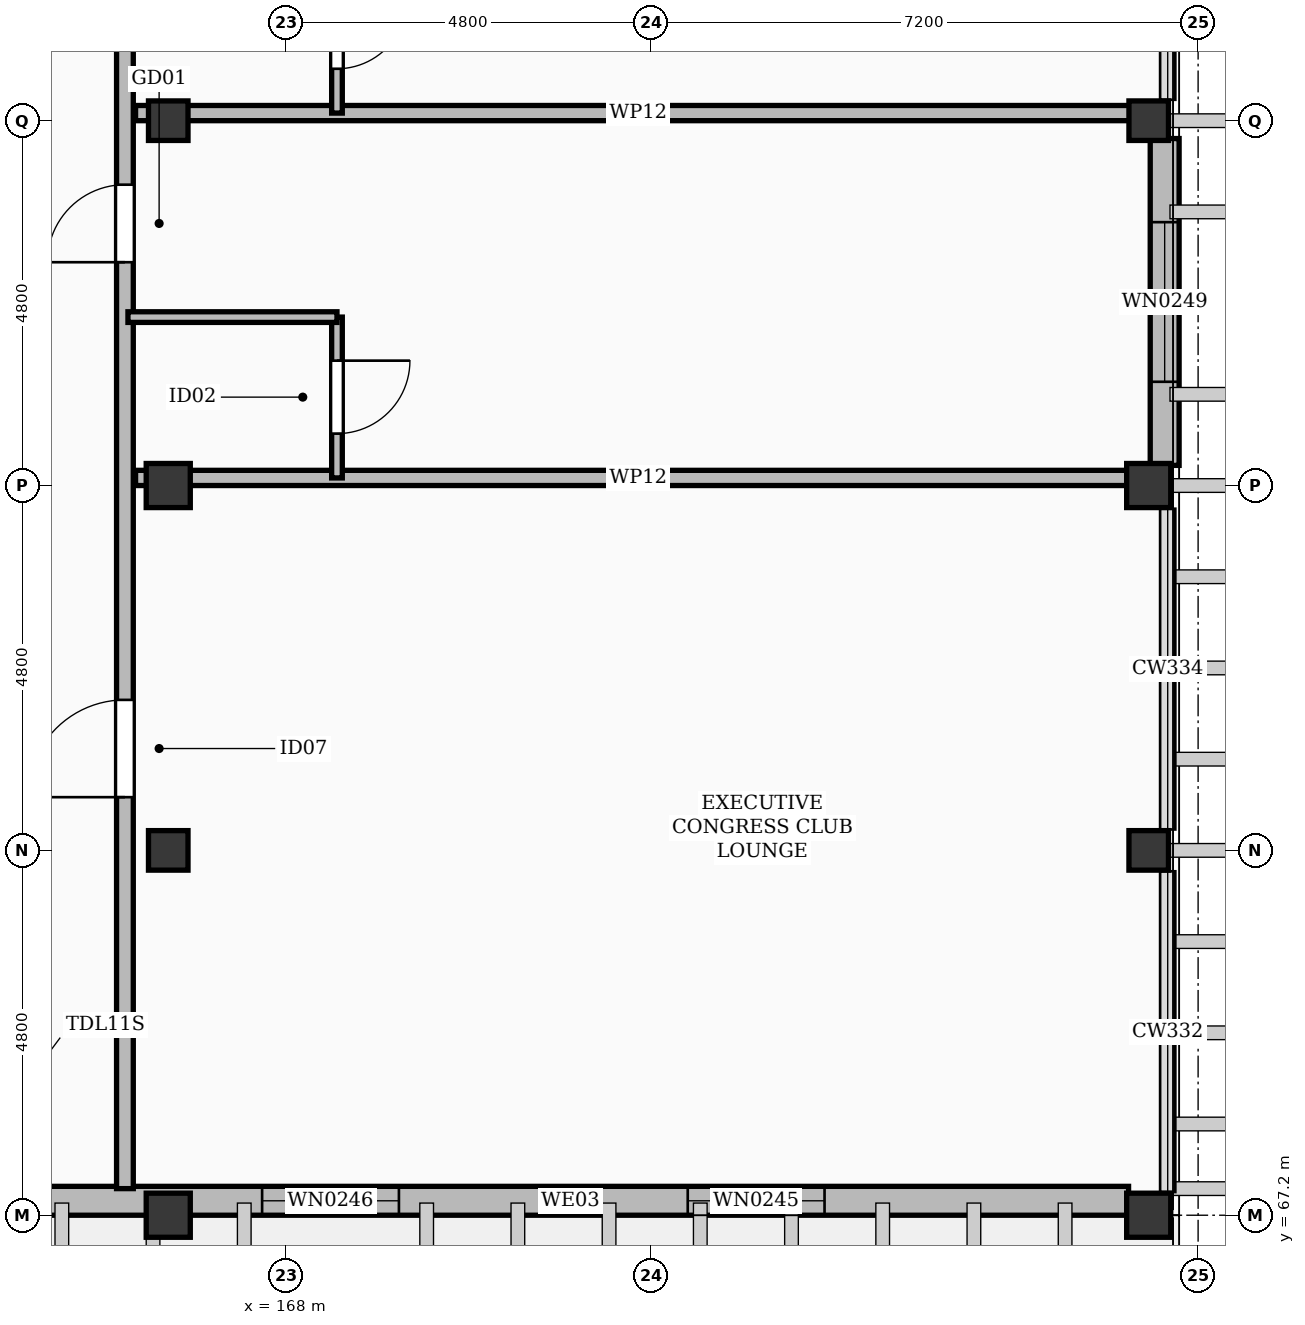
"""IFC4 building model, lengths in metres.
Left out: names, types, materials, properties, quantities, classifications, styles, units other than length and angle.
Written with IfcOpenShell. Run it as: python <this file> out.ifc"""

import sys

from ifc_helpers import new_model, si_unit, direction, frame, frame_2d, origin, origin_2d, place, context, subcontext, project, spatial, rectangle, extrude, element, fill, save


model = new_model("IFC4")
c1 = context("Model", 3, precision=1e-05, world=origin(), true_north=direction((0.0, 1.0)))
c2 = subcontext(c1, "Body", "Model", "MODEL_VIEW")
j1 = project(units=[si_unit("LENGTHUNIT", "METRE"), si_unit("PLANEANGLEUNIT", "RADIAN")], contexts=[c1])
p1 = place(None, origin())
s1 = spatial("IfcSite", under=j1, at=p1, CompositionType="ELEMENT")
p2 = place(p1, origin())
s2 = spatial("IfcBuilding", under=s1, at=p2, CompositionType="ELEMENT")
p3 = place(p2, frame((0.0, 0.0, 46.5)))
s3 = spatial("IfcBuildingStorey", under=s2, at=p3, CompositionType="ELEMENT", Elevation=46.5)
for number, where, z_axis, x_axis in (
    (1, (166.45, 67.2, 0.0), (0.0, 0.0, 1.0), (1.0, 0.0, 0.0)),
    (2, (166.45, 76.8, 0.0), (0.0, 0.0, 1.0), (1.0, 0.0, 0.0)),
    (3, (179.35, 67.2, 0.0), (0.0, 0.0, 1.0), (1.0, 0.0, 0.0)),
    (4, (179.35, 76.8, 0.0), (0.0, 0.0, 1.0), (1.0, 0.0, 0.0)),
):
    element("IfcColumn", number, at=place(p3, frame(where, z_axis=z_axis, x_axis=x_axis)), inside=s3, PredefinedType="COLUMN", context=c2, shape_type="SweptSolid", body=[
        extrude(rectangle(XDim=0.58, YDim=0.58, at=origin_2d()), origin(), (0.0, 0.0, 1.0), 3.9),
    ])
for number, where, z_axis, x_axis in (
    (5, (166.45, 72.0, 0.0), (0.0, 0.0, 1.0), (1.0, 0.0, 0.0)),
    (6, (166.45, 81.6, 0.0), (0.0, 0.0, 1.0), (1.0, 0.0, 0.0)),
    (7, (179.35, 72.0, 0.0), (0.0, 0.0, 1.0), (1.0, 0.0, 0.0)),
    (8, (179.35, 81.6, 0.0), (0.0, 0.0, 1.0), (1.0, 0.0, 0.0)),
):
    element("IfcColumn", number, at=place(p3, frame(where, z_axis=z_axis, x_axis=x_axis)), inside=s3, PredefinedType="COLUMN", context=c2, shape_type="SweptSolid", body=[
        extrude(rectangle(XDim=0.52, YDim=0.52, at=origin_2d()), origin(), (0.0, 0.0, 1.0), 3.9),
    ])
p4 = place(p3, frame((179.085, 67.39, 0.0), z_axis=(0.0, 0.0, 1.0), x_axis=(-1.0, 0.0, 0.0)))
e9 = element("IfcWall", 9, at=p4, inside=s3, PredefinedType="SOLIDWALL", context=c2, shape_type="SweptSolid", body=[
    extrude(rectangle(XDim=29.37, YDim=0.38, at=frame_2d((14.685, 0.0))), origin(), (0.0, 0.0, 1.0), 2.922),
])
p5 = place(p4, frame((14.5, 0.0, 0.0)))
e10 = element("IfcOpeningElement", 10, at=p5, cuts=e9, PredefinedType="OPENING", context=c2, shape_type="SweptSolid", body=[
    extrude(rectangle(XDim=1.6, YDim=2.25, at=frame_2d((0.8, 1.125))), frame((0.0, 0.202, 0.0), z_axis=(0.0, -1.0, 0.0), x_axis=(1.0, 0.0, 0.0)), (0.0, 0.0, 1.0), 0.404),
])
p6 = place(p4, frame((4.0, 0.0, 0.55)))
e11 = element("IfcOpeningElement", 11, at=p6, cuts=e9, PredefinedType="OPENING", context=c2, shape_type="SweptSolid", body=[
    extrude(rectangle(XDim=1.8, YDim=1.76, at=frame_2d((0.9, 0.88))), frame((0.0, 0.202, 0.0), z_axis=(0.0, -1.0, 0.0), x_axis=(1.0, 0.0, 0.0)), (0.0, 0.0, 1.0), 0.404),
])
p7 = place(p4, frame((9.6, 0.0, 0.55)))
e12 = element("IfcOpeningElement", 12, at=p7, cuts=e9, PredefinedType="OPENING", context=c2, shape_type="SweptSolid", body=[
    extrude(rectangle(XDim=1.8, YDim=1.76, at=frame_2d((0.9, 0.88))), frame((0.0, 0.202, 0.0), z_axis=(0.0, -1.0, 0.0), x_axis=(1.0, 0.0, 0.0)), (0.0, 0.0, 1.0), 0.404),
])
p8 = place(p4, frame((20.8, 0.0, 0.55)))
e13 = element("IfcOpeningElement", 13, at=p8, cuts=e9, PredefinedType="OPENING", context=c2, shape_type="SweptSolid", body=[
    extrude(rectangle(XDim=1.8, YDim=1.76, at=frame_2d((0.9, 0.88))), frame((0.0, 0.202, 0.0), z_axis=(0.0, -1.0, 0.0), x_axis=(1.0, 0.0, 0.0)), (0.0, 0.0, 1.0), 0.404),
])
p9 = place(p4, frame((25.4, 0.0, 0.55)))
e14 = element("IfcOpeningElement", 14, at=p9, cuts=e9, PredefinedType="OPENING", context=c2, shape_type="SweptSolid", body=[
    extrude(rectangle(XDim=1.8, YDim=1.76, at=frame_2d((0.9, 0.88))), frame((0.0, 0.202, 0.0), z_axis=(0.0, -1.0, 0.0), x_axis=(1.0, 0.0, 0.0)), (0.0, 0.0, 1.0), 0.404),
])
p10 = place(p3, frame((179.56, 81.365, 0.0), z_axis=(0.0, 0.0, 1.0), x_axis=(0.0, -1.0, 0.0)))
e15 = element("IfcWall", 15, at=p10, inside=s3, PredefinedType="SOLIDWALL", context=c2, shape_type="SweptSolid", body=[
    extrude(rectangle(XDim=4.3, YDim=0.38, at=frame_2d((2.15, 0.0))), origin(), (0.0, 0.0, 1.0), 3.072),
])
p11 = place(p10, frame((1.1, 0.0, 0.55)))
e16 = element("IfcOpeningElement", 16, at=p11, cuts=e15, PredefinedType="OPENING", context=c2, shape_type="SweptSolid", body=[
    extrude(rectangle(XDim=2.1, YDim=1.78, at=frame_2d((1.05, 0.89))), frame((0.0, 0.202, 0.0), z_axis=(0.0, -1.0, 0.0), x_axis=(1.0, 0.0, 0.0)), (0.0, 0.0, 1.0), 0.404),
])
p12 = place(p3, frame((165.88, 67.55, 0.0), z_axis=(0.0, 0.0, 1.0), x_axis=(0.0, 1.0, 0.0)))
e17 = element("IfcWall", 17, at=p12, inside=s3, PredefinedType="PARTITIONING", context=c2, shape_type="SweptSolid", body=[
    extrude(rectangle(XDim=58.1, YDim=0.22, at=frame_2d((29.05, 0.0))), origin(), (0.0, 0.0, 1.0), 2.922),
])
p13 = place(p12, frame((5.15, 0.0, 0.0)))
e18 = element("IfcOpeningElement", 18, at=p13, cuts=e17, PredefinedType="OPENING", context=c2, shape_type="SweptSolid", body=[
    extrude(rectangle(XDim=1.28, YDim=2.16, at=frame_2d((0.64, 1.08))), frame((0.0, 0.122, 0.0), z_axis=(0.0, -1.0, 0.0), x_axis=(1.0, 0.0, 0.0)), (0.0, 0.0, 1.0), 0.244),
])
p14 = place(p12, frame((12.188, 0.0, 0.0)))
e19 = element("IfcOpeningElement", 19, at=p14, cuts=e17, PredefinedType="OPENING", context=c2, shape_type="SweptSolid", body=[
    extrude(rectangle(XDim=1.02, YDim=2.2, at=frame_2d((0.51, 1.1))), frame((0.0, 0.122, 0.0), z_axis=(0.0, -1.0, 0.0), x_axis=(1.0, 0.0, 0.0)), (0.0, 0.0, 1.0), 0.244),
])
p15 = place(p12, frame((16.638, 0.0, 0.0)))
e20 = element("IfcOpeningElement", 20, at=p15, cuts=e17, PredefinedType="OPENING", context=c2, shape_type="SweptSolid", body=[
    extrude(rectangle(XDim=1.5, YDim=2.3, at=frame_2d((0.75, 1.15))), frame((0.0, 0.122, 0.0), z_axis=(0.0, -1.0, 0.0), x_axis=(1.0, 0.0, 0.0)), (0.0, 0.0, 1.0), 0.244),
])
p16 = place(p12, frame((21.788, 0.0, 0.0)))
e21 = element("IfcOpeningElement", 21, at=p16, cuts=e17, PredefinedType="OPENING", context=c2, shape_type="SweptSolid", body=[
    extrude(rectangle(XDim=1.12, YDim=2.15, at=frame_2d((0.56, 1.075))), frame((0.0, 0.122, 0.0), z_axis=(0.0, -1.0, 0.0), x_axis=(1.0, 0.0, 0.0)), (0.0, 0.0, 1.0), 0.244),
])
p17 = place(p12, frame((26.588, 0.0, 0.0)))
e22 = element("IfcOpeningElement", 22, at=p17, cuts=e17, PredefinedType="OPENING", context=c2, shape_type="SweptSolid", body=[
    extrude(rectangle(XDim=1.28, YDim=2.16, at=frame_2d((0.64, 1.08))), frame((0.0, 0.122, 0.0), z_axis=(0.0, -1.0, 0.0), x_axis=(1.0, 0.0, 0.0)), (0.0, 0.0, 1.0), 0.244),
])
p18 = place(p12, frame((31.388, 0.0, 0.0)))
e23 = element("IfcOpeningElement", 23, at=p18, cuts=e17, PredefinedType="OPENING", context=c2, shape_type="SweptSolid", body=[
    extrude(rectangle(XDim=1.05, YDim=2.18, at=frame_2d((0.525, 1.09))), frame((0.0, 0.122, 0.0), z_axis=(0.0, -1.0, 0.0), x_axis=(1.0, 0.0, 0.0)), (0.0, 0.0, 1.0), 0.244),
])
p19 = place(p12, frame((36.188, 0.0, 0.0)))
e24 = element("IfcOpeningElement", 24, at=p19, cuts=e17, PredefinedType="OPENING", context=c2, shape_type="SweptSolid", body=[
    extrude(rectangle(XDim=1.08, YDim=2.25, at=frame_2d((0.54, 1.125))), frame((0.0, 0.122, 0.0), z_axis=(0.0, -1.0, 0.0), x_axis=(1.0, 0.0, 0.0)), (0.0, 0.0, 1.0), 0.244),
])
p20 = place(p12, frame((40.988, 0.0, 0.0)))
e25 = element("IfcOpeningElement", 25, at=p20, cuts=e17, PredefinedType="OPENING", context=c2, shape_type="SweptSolid", body=[
    extrude(rectangle(XDim=1.02, YDim=2.2, at=frame_2d((0.51, 1.1))), frame((0.0, 0.122, 0.0), z_axis=(0.0, -1.0, 0.0), x_axis=(1.0, 0.0, 0.0)), (0.0, 0.0, 1.0), 0.244),
])
p21 = place(p12, frame((45.438, 0.0, 0.0)))
e26 = element("IfcOpeningElement", 26, at=p21, cuts=e17, PredefinedType="OPENING", context=c2, shape_type="SweptSolid", body=[
    extrude(rectangle(XDim=1.5, YDim=2.3, at=frame_2d((0.75, 1.15))), frame((0.0, 0.122, 0.0), z_axis=(0.0, -1.0, 0.0), x_axis=(1.0, 0.0, 0.0)), (0.0, 0.0, 1.0), 0.244),
])
p22 = place(p12, frame((50.588, 0.0, 0.0)))
e27 = element("IfcOpeningElement", 27, at=p22, cuts=e17, PredefinedType="OPENING", context=c2, shape_type="SweptSolid", body=[
    extrude(rectangle(XDim=1.12, YDim=2.15, at=frame_2d((0.56, 1.075))), frame((0.0, 0.122, 0.0), z_axis=(0.0, -1.0, 0.0), x_axis=(1.0, 0.0, 0.0)), (0.0, 0.0, 1.0), 0.244),
])
p23 = place(p12, frame((55.388, 0.0, 0.0)))
e28 = element("IfcOpeningElement", 28, at=p23, cuts=e17, PredefinedType="OPENING", context=c2, shape_type="SweptSolid", body=[
    extrude(rectangle(XDim=1.28, YDim=2.16, at=frame_2d((0.64, 1.08))), frame((0.0, 0.122, 0.0), z_axis=(0.0, -1.0, 0.0), x_axis=(1.0, 0.0, 0.0)), (0.0, 0.0, 1.0), 0.244),
])
p24 = place(p3, frame((166.02, 76.9, 0.0), z_axis=(0.0, 0.0, 1.0), x_axis=(1.0, 0.0, 0.0)))
e29 = element("IfcWall", 29, at=p24, inside=s3, PredefinedType="PARTITIONING", context=c2, shape_type="SweptSolid", body=[
    extrude(rectangle(XDim=13.23, YDim=0.2, at=frame_2d((6.615, 0.0))), origin(), (0.0, 0.0, 1.0), 3.072),
])
p25 = place(p3, frame((168.67, 76.9, 0.0), z_axis=(0.0, 0.0, 1.0), x_axis=(0.0, 1.0, 0.0)))
e30 = element("IfcWall", 30, at=p25, inside=s3, PredefinedType="PARTITIONING", context=c2, shape_type="SweptSolid", body=[
    extrude(rectangle(XDim=2.116, YDim=0.14, at=frame_2d((1.058, 0.0))), origin(), (0.0, 0.0, 1.0), 3.072),
])
p26 = place(p25, frame((0.583, 0.0, 0.0)))
e31 = element("IfcOpeningElement", 31, at=p26, cuts=e30, PredefinedType="OPENING", context=c2, shape_type="SweptSolid", body=[
    extrude(rectangle(XDim=0.96, YDim=2.12, at=frame_2d((0.48, 1.06))), frame((0.0, 0.082, 0.0), z_axis=(0.0, -1.0, 0.0), x_axis=(1.0, 0.0, 0.0)), (0.0, 0.0, 1.0), 0.164),
])
p27 = place(p3, frame((165.92, 79.016, 0.0), z_axis=(0.0, 0.0, 1.0), x_axis=(1.0, 0.0, 0.0)))
e32 = element("IfcWall", 32, at=p27, inside=s3, PredefinedType="PARTITIONING", context=c2, shape_type="SweptSolid", body=[
    extrude(rectangle(XDim=2.75, YDim=0.14, at=frame_2d((1.375, 0.0))), origin(), (0.0, 0.0, 1.0), 3.072),
])
p28 = place(p3, frame((166.02, 81.7, 0.0), z_axis=(0.0, 0.0, 1.0), x_axis=(1.0, 0.0, 0.0)))
e33 = element("IfcWall", 33, at=p28, inside=s3, PredefinedType="PARTITIONING", context=c2, shape_type="SweptSolid", body=[
    extrude(rectangle(XDim=13.23, YDim=0.2, at=frame_2d((6.615, 0.0))), origin(), (0.0, 0.0, 1.0), 3.072),
])
p29 = place(p3, frame((168.67, 81.7, 0.0), z_axis=(0.0, 0.0, 1.0), x_axis=(0.0, 1.0, 0.0)))
e34 = element("IfcWall", 34, at=p29, inside=s3, PredefinedType="PARTITIONING", context=c2, shape_type="SweptSolid", body=[
    extrude(rectangle(XDim=2.116, YDim=0.14, at=frame_2d((1.058, 0.0))), origin(), (0.0, 0.0, 1.0), 3.072),
])
p30 = place(p29, frame((0.583, 0.0, 0.0)))
e35 = element("IfcOpeningElement", 35, at=p30, cuts=e34, PredefinedType="OPENING", context=c2, shape_type="SweptSolid", body=[
    extrude(rectangle(XDim=0.92, YDim=2.1, at=frame_2d((0.46, 1.05))), frame((0.0, 0.082, 0.0), z_axis=(0.0, -1.0, 0.0), x_axis=(1.0, 0.0, 0.0)), (0.0, 0.0, 1.0), 0.164),
])
p31 = place(p6, origin())
e36 = element("IfcWindow", 36, at=p31, inside=s3, PartitioningType="SINGLE_PANEL", PredefinedType="WINDOW", context=c2, shape_type="SweptSolid", body=[
    extrude(rectangle(XDim=1.8, YDim=1.76, at=frame_2d((0.9, 0.88))), frame((0.0, 0.03, 0.0), z_axis=(0.0, -1.0, 0.0), x_axis=(1.0, 0.0, 0.0)), (0.0, 0.0, 1.0), 0.06),
])
fill(e11, e36)
p32 = place(p7, origin())
e37 = element("IfcWindow", 37, at=p32, inside=s3, PartitioningType="SINGLE_PANEL", PredefinedType="WINDOW", context=c2, shape_type="SweptSolid", body=[
    extrude(rectangle(XDim=1.8, YDim=1.76, at=frame_2d((0.9, 0.88))), frame((0.0, 0.03, 0.0), z_axis=(0.0, -1.0, 0.0), x_axis=(1.0, 0.0, 0.0)), (0.0, 0.0, 1.0), 0.06),
])
fill(e12, e37)
p33 = place(p11, origin())
e38 = element("IfcWindow", 38, at=p33, inside=s3, PartitioningType="SINGLE_PANEL", PredefinedType="WINDOW", context=c2, shape_type="SweptSolid", body=[
    extrude(rectangle(XDim=2.1, YDim=1.78, at=frame_2d((1.05, 0.89))), frame((0.0, 0.03, 0.0), z_axis=(0.0, -1.0, 0.0), x_axis=(1.0, 0.0, 0.0)), (0.0, 0.0, 1.0), 0.06),
])
fill(e16, e38)
p34 = place(p13, origin())
e39 = element("IfcDoor", 39, at=p34, inside=s3, OperationType="SINGLE_SWING_LEFT", PredefinedType="DOOR", context=c2, shape_type="SweptSolid", body=[
    extrude(rectangle(XDim=1.28, YDim=2.16, at=frame_2d((0.64, 1.08))), frame((0.0, 0.025, 0.0), z_axis=(0.0, -1.0, 0.0), x_axis=(1.0, 0.0, 0.0)), (0.0, 0.0, 1.0), 0.05),
])
fill(e18, e39)
p35 = place(p14, origin())
e40 = element("IfcDoor", 40, at=p35, inside=s3, OperationType="SINGLE_SWING_LEFT", PredefinedType="DOOR", context=c2, shape_type="SweptSolid", body=[
    extrude(rectangle(XDim=1.02, YDim=2.2, at=frame_2d((0.51, 1.1))), frame((0.0, 0.025, 0.0), z_axis=(0.0, -1.0, 0.0), x_axis=(1.0, 0.0, 0.0)), (0.0, 0.0, 1.0), 0.05),
])
fill(e19, e40)
p36 = place(p26, frame((0.96, 0.0, 0.0), z_axis=(0.0, 0.0, 1.0), x_axis=(-1.0, 0.0, 0.0)))
e41 = element("IfcDoor", 41, at=p36, inside=s3, OperationType="SINGLE_SWING_RIGHT", PredefinedType="DOOR", context=c2, shape_type="SweptSolid", body=[
    extrude(rectangle(XDim=0.96, YDim=2.12, at=frame_2d((0.48, 1.06))), frame((0.0, 0.025, 0.0), z_axis=(0.0, -1.0, 0.0), x_axis=(1.0, 0.0, 0.0)), (0.0, 0.0, 1.0), 0.05),
])
fill(e31, e41)
p37 = place(p30, frame((0.92, 0.0, 0.0), z_axis=(0.0, 0.0, 1.0), x_axis=(-1.0, 0.0, 0.0)))
e42 = element("IfcDoor", 42, at=p37, inside=s3, OperationType="SINGLE_SWING_RIGHT", PredefinedType="DOOR", context=c2, shape_type="SweptSolid", body=[
    extrude(rectangle(XDim=0.92, YDim=2.1, at=frame_2d((0.46, 1.05))), frame((0.0, 0.025, 0.0), z_axis=(0.0, -1.0, 0.0), x_axis=(1.0, 0.0, 0.0)), (0.0, 0.0, 1.0), 0.05),
])
fill(e35, e42)
save(model, sys.argv[1])
